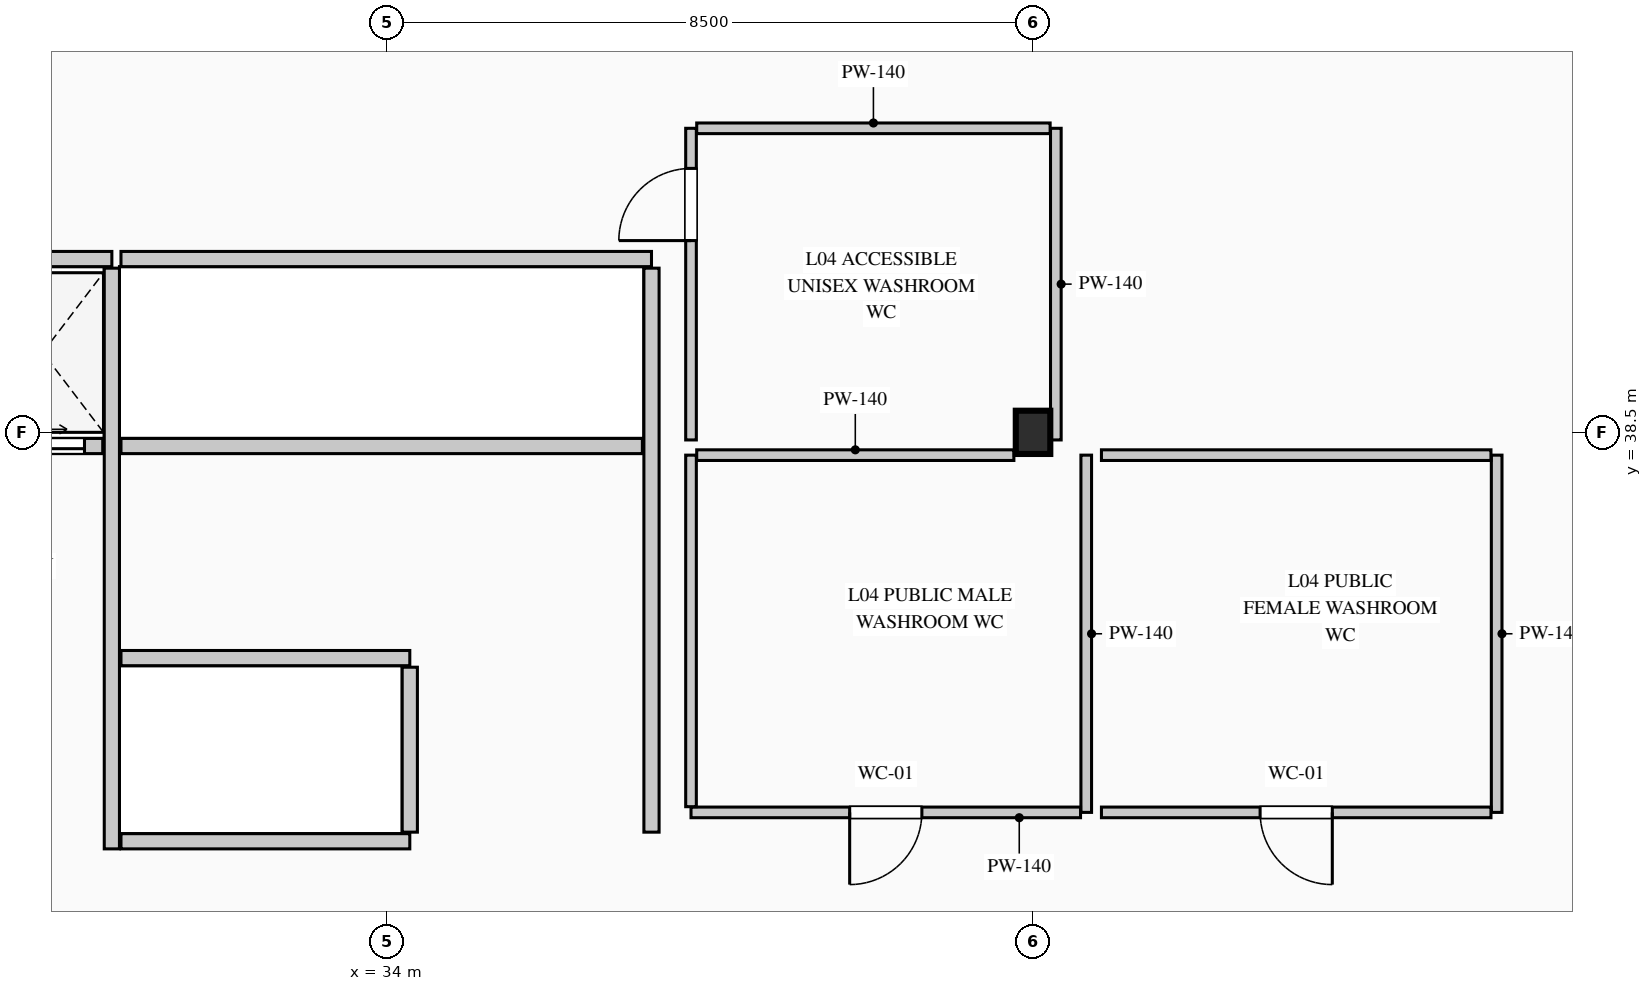
"""IFC4 building model, lengths in metres.
Left out: names, types, materials, properties, quantities, classifications, styles, units other than length and angle.
Written with IfcOpenShell. Run it as: python <this file> out.ifc"""

import sys

from ifc_helpers import new_model, si_unit, direction, frame, frame_2d, origin, origin_2d, place, context, subcontext, project, spatial, rectangle, i_section, extrude, element, fill, save


model = new_model("IFC4")
c1 = context("Model", 3, precision=1e-05, world=origin(), true_north=direction((0.0, 1.0)))
c2 = subcontext(c1, "Body", "Model", "MODEL_VIEW")
j1 = project(units=[si_unit("LENGTHUNIT", "METRE"), si_unit("PLANEANGLEUNIT", "RADIAN")], contexts=[c1])
p1 = place(None, origin())
s1 = spatial("IfcSite", under=j1, at=p1, CompositionType="ELEMENT")
p2 = place(p1, origin())
s2 = spatial("IfcBuilding", under=s1, at=p2, CompositionType="ELEMENT")
p3 = place(p2, frame((0.0, 0.0, 16.2)))
s3 = spatial("IfcBuildingStorey", under=s2, at=p3, CompositionType="ELEMENT", Elevation=16.2)
p4 = place(p3, frame((42.5, 38.5, 0.0), z_axis=(0.0, 0.0, 1.0), x_axis=(1.0, 0.0, 0.0)))
e1 = element("IfcColumn", 1, at=p4, inside=s3, PredefinedType="COLUMN", context=c2, shape_type="SweptSolid", body=[
    extrude(i_section(OverallWidth=0.454, OverallDepth=0.569, WebThickness=0.078, FlangeThickness=0.08, FilletRadius=0.015, at=origin_2d()), origin(), (0.0, 0.0, 1.0), 5.4),
])
p5 = place(p3, frame((23.47, 40.78, 0.0), z_axis=(0.0, 0.0, 1.0), x_axis=(1.0, 0.0, 0.0)))
e2 = element("IfcWall", 2, at=p5, inside=s3, PredefinedType="PARTITIONING", context=c2, shape_type="SweptSolid", body=[
    extrude(rectangle(XDim=6.91, YDim=0.2, at=frame_2d((3.455, 0.0))), origin(), (0.0, 0.0, 1.0), 5.0),
])
p6 = place(p3, frame((30.38, 33.02, 0.0), z_axis=(0.0, 0.0, 1.0), x_axis=(0.0, 1.0, 0.0)))
e3 = element("IfcWall", 3, at=p6, inside=s3, PredefinedType="PARTITIONING", context=c2, shape_type="SweptSolid", body=[
    extrude(rectangle(XDim=7.64, YDim=0.2, at=frame_2d((3.82, 0.0))), origin(), (0.0, 0.0, 1.0), 5.0),
])
p7 = place(p3, frame((23.47, 38.32, 0.0), z_axis=(0.0, 0.0, 1.0), x_axis=(1.0, 0.0, 0.0)))
e4 = element("IfcWall", 4, at=p7, inside=s3, PredefinedType="PARTITIONING", context=c2, shape_type="SweptSolid", body=[
    extrude(rectangle(XDim=6.79, YDim=0.2, at=frame_2d((3.395, 0.0))), origin(), (0.0, 0.0, 1.0), 5.0),
])
p8 = place(p7, frame((0.29, 0.0, 0.0)))
e5 = element("IfcOpeningElement", 5, at=p8, cuts=e4, PredefinedType="OPENING", context=c2, shape_type="SweptSolid", body=[
    extrude(rectangle(XDim=1.1, YDim=2.2, at=frame_2d((0.55, 1.1))), frame((0.0, 0.11, 0.0), z_axis=(0.0, -1.0, 0.0), x_axis=(1.0, 0.0, 0.0)), (0.0, 0.0, 1.0), 0.22),
])
p9 = place(p7, frame((2.01, 0.0, 0.0)))
e6 = element("IfcOpeningElement", 6, at=p9, cuts=e4, PredefinedType="OPENING", context=c2, shape_type="SweptSolid", body=[
    extrude(rectangle(XDim=1.1, YDim=2.2, at=frame_2d((0.55, 1.1))), frame((0.0, 0.11, 0.0), z_axis=(0.0, -1.0, 0.0), x_axis=(1.0, 0.0, 0.0)), (0.0, 0.0, 1.0), 0.22),
])
p10 = place(p7, frame((3.73, 0.0, 0.0)))
e7 = element("IfcOpeningElement", 7, at=p10, cuts=e4, PredefinedType="OPENING", context=c2, shape_type="SweptSolid", body=[
    extrude(rectangle(XDim=1.1, YDim=2.2, at=frame_2d((0.55, 1.1))), frame((0.0, 0.11, 0.0), z_axis=(0.0, -1.0, 0.0), x_axis=(1.0, 0.0, 0.0)), (0.0, 0.0, 1.0), 0.22),
])
p11 = place(p7, frame((5.45, 0.0, 0.0)))
e8 = element("IfcOpeningElement", 8, at=p11, cuts=e4, PredefinedType="OPENING", context=c2, shape_type="SweptSolid", body=[
    extrude(rectangle(XDim=1.1, YDim=2.2, at=frame_2d((0.55, 1.1))), frame((0.0, 0.11, 0.0), z_axis=(0.0, -1.0, 0.0), x_axis=(1.0, 0.0, 0.0)), (0.0, 0.0, 1.0), 0.22),
])
p12 = place(p3, frame((30.5, 40.78, 0.0), z_axis=(0.0, 0.0, 1.0), x_axis=(1.0, 0.0, 0.0)))
e9 = element("IfcWall", 9, at=p12, inside=s3, PredefinedType="PARTITIONING", context=c2, shape_type="SweptSolid", body=[
    extrude(rectangle(XDim=6.98, YDim=0.2, at=frame_2d((3.49, 0.0))), origin(), (0.0, 0.0, 1.0), 5.0),
])
p13 = place(p3, frame((37.48, 33.24, 0.0), z_axis=(0.0, 0.0, 1.0), x_axis=(0.0, 1.0, 0.0)))
e10 = element("IfcWall", 10, at=p13, inside=s3, PredefinedType="PARTITIONING", context=c2, shape_type="SweptSolid", body=[
    extrude(rectangle(XDim=7.42, YDim=0.2, at=frame_2d((3.71, 0.0))), origin(), (0.0, 0.0, 1.0), 5.0),
])
p14 = place(p3, frame((30.5, 38.32, 0.0), z_axis=(0.0, 0.0, 1.0), x_axis=(1.0, 0.0, 0.0)))
e11 = element("IfcWall", 11, at=p14, inside=s3, PredefinedType="PARTITIONING", context=c2, shape_type="SweptSolid", body=[
    extrude(rectangle(XDim=6.86, YDim=0.2, at=frame_2d((3.43, 0.0))), origin(), (0.0, 0.0, 1.0), 5.0),
])
for number, where, z_axis, x_axis in (
    (12, (30.5, 35.53, 0.0), (0.0, 0.0, 1.0), (1.0, 0.0, 0.0)),
    (13, (30.5, 33.12, 0.0), (0.0, 0.0, 1.0), (1.0, 0.0, 0.0)),
):
    element("IfcWall", number, at=place(p3, frame(where, z_axis=z_axis, x_axis=x_axis)), inside=s3, PredefinedType="PARTITIONING", context=c2, shape_type="SweptSolid", body=[
        extrude(rectangle(XDim=3.8, YDim=0.2, at=frame_2d((1.9, 0.0))), origin(), (0.0, 0.0, 1.0), 5.0),
    ])
p15 = place(p3, frame((34.3, 33.24, 0.0), z_axis=(0.0, 0.0, 1.0), x_axis=(0.0, 1.0, 0.0)))
e14 = element("IfcWall", 14, at=p15, inside=s3, PredefinedType="PARTITIONING", context=c2, shape_type="SweptSolid", body=[
    extrude(rectangle(XDim=2.17, YDim=0.2, at=frame_2d((1.085, 0.0))), origin(), (0.0, 0.0, 1.0), 5.0),
])
p16 = place(p3, frame((43.2, 38.2, 0.0), z_axis=(0.0, 0.0, 1.0), x_axis=(0.0, -1.0, 0.0)))
e15 = element("IfcWall", 15, at=p16, inside=s3, PredefinedType="PARTITIONING", context=c2, shape_type="SweptSolid", body=[
    extrude(rectangle(XDim=4.7, YDim=0.14, at=frame_2d((2.35, 0.0))), origin(), (0.0, 0.0, 1.0), 4.485),
])
p17 = place(p3, frame((43.125, 33.5, 0.0), z_axis=(0.0, 0.0, 1.0), x_axis=(-1.0, 0.0, 0.0)))
e16 = element("IfcWall", 16, at=p17, inside=s3, PredefinedType="PARTITIONING", context=c2, shape_type="SweptSolid", body=[
    extrude(rectangle(XDim=5.125, YDim=0.14, at=frame_2d((2.562, 0.0))), origin(), (0.0, 0.0, 1.0), 5.0),
])
p18 = place(p17, frame((2.087, 0.0, 0.0)))
e17 = element("IfcOpeningElement", 17, at=p18, cuts=e16, PredefinedType="OPENING", context=c2, shape_type="SweptSolid", body=[
    extrude(rectangle(XDim=0.95, YDim=2.15, at=frame_2d((0.475, 1.075))), frame((0.0, 0.08, 0.0), z_axis=(0.0, -1.0, 0.0), x_axis=(1.0, 0.0, 0.0)), (0.0, 0.0, 1.0), 0.16),
])
p19 = place(p3, frame((38.0, 33.575, 0.0), z_axis=(0.0, 0.0, 1.0), x_axis=(0.0, 1.0, 0.0)))
e18 = element("IfcWall", 18, at=p19, inside=s3, PredefinedType="PARTITIONING", context=c2, shape_type="SweptSolid", body=[
    extrude(rectangle(XDim=4.625, YDim=0.14, at=frame_2d((2.312, 0.0))), origin(), (0.0, 0.0, 1.0), 5.0),
])
p20 = place(p3, frame((38.075, 38.2, 0.0), z_axis=(0.0, 0.0, 1.0), x_axis=(1.0, 0.0, 0.0)))
e19 = element("IfcWall", 19, at=p20, inside=s3, PredefinedType="PARTITIONING", context=c2, shape_type="SweptSolid", body=[
    extrude(rectangle(XDim=4.173, YDim=0.14, at=frame_2d((2.086, 0.0))), origin(), (0.0, 0.0, 1.0), 5.0),
])
p21 = place(p3, frame((48.6, 38.2, 0.0), z_axis=(0.0, 0.0, 1.0), x_axis=(0.0, -1.0, 0.0)))
e20 = element("IfcWall", 20, at=p21, inside=s3, PredefinedType="PARTITIONING", context=c2, shape_type="SweptSolid", body=[
    extrude(rectangle(XDim=4.7, YDim=0.14, at=frame_2d((2.35, 0.0))), origin(), (0.0, 0.0, 1.0), 5.0),
])
p22 = place(p3, frame((48.525, 33.5, 0.0), z_axis=(0.0, 0.0, 1.0), x_axis=(-1.0, 0.0, 0.0)))
e21 = element("IfcWall", 21, at=p22, inside=s3, PredefinedType="PARTITIONING", context=c2, shape_type="SweptSolid", body=[
    extrude(rectangle(XDim=5.125, YDim=0.14, at=frame_2d((2.562, 0.0))), origin(), (0.0, 0.0, 1.0), 5.0),
])
p23 = place(p22, frame((2.087, 0.0, 0.0)))
e22 = element("IfcOpeningElement", 22, at=p23, cuts=e21, PredefinedType="OPENING", context=c2, shape_type="SweptSolid", body=[
    extrude(rectangle(XDim=0.95, YDim=2.15, at=frame_2d((0.475, 1.075))), frame((0.0, 0.08, 0.0), z_axis=(0.0, -1.0, 0.0), x_axis=(1.0, 0.0, 0.0)), (0.0, 0.0, 1.0), 0.16),
])
p24 = place(p3, frame((43.4, 38.2, 0.0), z_axis=(0.0, 0.0, 1.0), x_axis=(1.0, 0.0, 0.0)))
e23 = element("IfcWall", 23, at=p24, inside=s3, PredefinedType="PARTITIONING", context=c2, shape_type="SweptSolid", body=[
    extrude(rectangle(XDim=5.125, YDim=0.14, at=frame_2d((2.562, 0.0))), origin(), (0.0, 0.0, 1.0), 5.0),
])
p25 = place(p3, frame((42.8, 42.5, 0.0), z_axis=(0.0, 0.0, 1.0), x_axis=(0.0, -1.0, 0.0)))
e24 = element("IfcWall", 24, at=p25, inside=s3, PredefinedType="PARTITIONING", context=c2, shape_type="SweptSolid", body=[
    extrude(rectangle(XDim=4.1, YDim=0.14, at=frame_2d((2.05, 0.0))), origin(), (0.0, 0.0, 1.0), 5.0),
])
p26 = place(p3, frame((38.0, 38.4, 0.0), z_axis=(0.0, 0.0, 1.0), x_axis=(0.0, 1.0, 0.0)))
e25 = element("IfcWall", 25, at=p26, inside=s3, PredefinedType="PARTITIONING", context=c2, shape_type="SweptSolid", body=[
    extrude(rectangle(XDim=4.1, YDim=0.14, at=frame_2d((2.05, 0.0))), origin(), (0.0, 0.0, 1.0), 5.0),
])
p27 = place(p26, frame((2.623, 0.0, 0.0)))
e26 = element("IfcOpeningElement", 26, at=p27, cuts=e25, PredefinedType="OPENING", context=c2, shape_type="SweptSolid", body=[
    extrude(rectangle(XDim=0.95, YDim=2.15, at=frame_2d((0.475, 1.075))), frame((0.0, 0.08, 0.0), z_axis=(0.0, -1.0, 0.0), x_axis=(1.0, 0.0, 0.0)), (0.0, 0.0, 1.0), 0.16),
])
p28 = place(p3, frame((38.075, 42.5, 0.0), z_axis=(0.0, 0.0, 1.0), x_axis=(1.0, 0.0, 0.0)))
e27 = element("IfcWall", 27, at=p28, inside=s3, PredefinedType="PARTITIONING", context=c2, shape_type="SweptSolid", body=[
    extrude(rectangle(XDim=4.65, YDim=0.14, at=frame_2d((2.325, 0.0))), origin(), (0.0, 0.0, 1.0), 5.0),
])
p29 = place(p11, origin())
e28 = element("IfcDoor", 28, at=p29, inside=s3, OperationType="DOUBLE_DOOR_SLIDING", PredefinedType="DOOR", context=c2, shape_type="SweptSolid", body=[
    extrude(rectangle(XDim=1.1, YDim=2.2, at=frame_2d((0.55, 1.1))), frame((0.0, 0.025, 0.0), z_axis=(0.0, -1.0, 0.0), x_axis=(1.0, 0.0, 0.0)), (0.0, 0.0, 1.0), 0.05),
])
fill(e8, e28)
p30 = place(p18, origin())
e29 = element("IfcDoor", 29, at=p30, inside=s3, OperationType="SINGLE_SWING_RIGHT", PredefinedType="DOOR", context=c2, shape_type="SweptSolid", body=[
    extrude(rectangle(XDim=0.95, YDim=2.15, at=frame_2d((0.475, 1.075))), frame((0.0, 0.025, 0.0), z_axis=(0.0, -1.0, 0.0), x_axis=(1.0, 0.0, 0.0)), (0.0, 0.0, 1.0), 0.05),
])
fill(e17, e29)
p31 = place(p23, origin())
e30 = element("IfcDoor", 30, at=p31, inside=s3, OperationType="SINGLE_SWING_LEFT", PredefinedType="DOOR", context=c2, shape_type="SweptSolid", body=[
    extrude(rectangle(XDim=0.95, YDim=2.15, at=frame_2d((0.475, 1.075))), frame((0.0, 0.025, 0.0), z_axis=(0.0, -1.0, 0.0), x_axis=(1.0, 0.0, 0.0)), (0.0, 0.0, 1.0), 0.05),
])
fill(e22, e30)
p32 = place(p27, origin())
e31 = element("IfcDoor", 31, at=p32, inside=s3, OperationType="SINGLE_SWING_LEFT", PredefinedType="DOOR", context=c2, shape_type="SweptSolid", body=[
    extrude(rectangle(XDim=0.95, YDim=2.15, at=frame_2d((0.475, 1.075))), frame((0.0, 0.025, 0.0), z_axis=(0.0, -1.0, 0.0), x_axis=(1.0, 0.0, 0.0)), (0.0, 0.0, 1.0), 0.05),
])
fill(e26, e31)
save(model, sys.argv[1])
